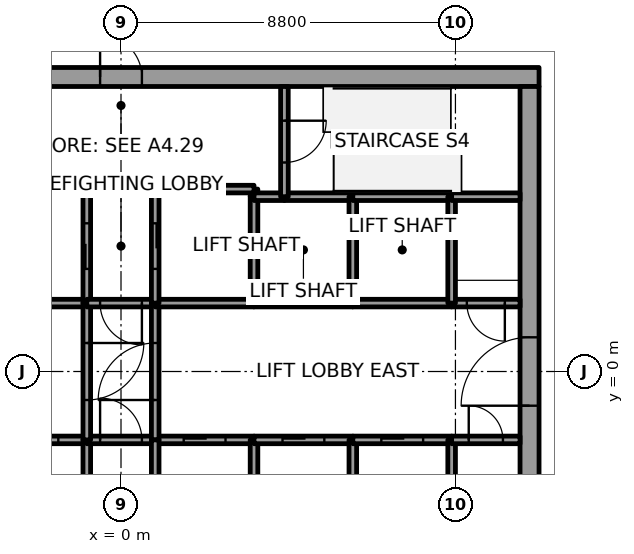
"""IFC4 building model, lengths in metres.
Left out: names, types, materials, properties, quantities, classifications, styles, units other than length and angle.
Written with IfcOpenShell. Run it as: python <this file> out.ifc"""

import sys

from ifc_helpers import new_model, si_unit, direction, frame, frame_2d, origin, place, context, subcontext, project, spatial, rectangle, extrude, element, fill, save


model = new_model("IFC4")
c1 = context("Model", 3, precision=1e-05, world=origin(), true_north=direction((0.0, 1.0)))
c2 = subcontext(c1, "Body", "Model", "MODEL_VIEW")
j1 = project(units=[si_unit("LENGTHUNIT", "METRE"), si_unit("PLANEANGLEUNIT", "RADIAN")], contexts=[c1])
p1 = place(None, origin())
s1 = spatial("IfcSite", under=j1, at=p1, CompositionType="ELEMENT")
p2 = place(p1, origin())
s2 = spatial("IfcBuilding", under=s1, at=p2, CompositionType="ELEMENT")
p3 = place(p2, frame((0.0, 0.0, 129.8)))
s3 = spatial("IfcBuildingStorey", under=s2, at=p3, CompositionType="ELEMENT", Elevation=129.8)
p4 = place(p3, frame((-11.0, 7.75, 0.0), z_axis=(0.0, 0.0, 1.0), x_axis=(1.0, 0.0, 0.0)))
e1 = element("IfcWall", 1, at=p4, inside=s3, PredefinedType="SHEAR", context=c2, shape_type="SweptSolid", body=[
    extrude(rectangle(XDim=22.0, YDim=0.5, at=frame_2d((11.0, 0.0))), origin(), (0.0, 0.0, 1.0), 4.0),
])
p5 = place(p4, frame((10.45, 0.0, 0.0)))
e2 = element("IfcOpeningElement", 2, at=p5, cuts=e1, PredefinedType="OPENING", context=c2, shape_type="SweptSolid", body=[
    extrude(rectangle(XDim=1.1, YDim=2.1, at=frame_2d((0.55, 1.05))), frame((0.0, 0.25, 0.0), z_axis=(0.0, -1.0, 0.0), x_axis=(1.0, 0.0, 0.0)), (0.0, 0.0, 1.0), 0.5),
])
p6 = place(p3, frame((10.75, -7.5, 0.0), z_axis=(0.0, 0.0, 1.0), x_axis=(0.0, 1.0, 0.0)))
e3 = element("IfcWall", 3, at=p6, inside=s3, PredefinedType="SHEAR", context=c2, shape_type="SweptSolid", body=[
    extrude(rectangle(XDim=15.0, YDim=0.5, at=frame_2d((7.5, 0.0))), origin(), (0.0, 0.0, 1.0), 4.0),
])
p7 = place(p6, frame((6.6, 0.0, 0.0)))
e4 = element("IfcOpeningElement", 4, at=p7, cuts=e3, PredefinedType="OPENING", context=c2, shape_type="SweptSolid", body=[
    extrude(rectangle(XDim=1.8, YDim=2.1, at=frame_2d((0.9, 1.05))), frame((0.0, 0.25, 0.0), z_axis=(0.0, -1.0, 0.0), x_axis=(1.0, 0.0, 0.0)), (0.0, 0.0, 1.0), 0.5),
])
p8 = place(p3, frame((-3.5, -1.8, 0.0), z_axis=(0.0, 0.0, 1.0), x_axis=(1.0, 0.0, 0.0)))
e5 = element("IfcWall", 5, at=p8, inside=s3, PredefinedType="SOLIDWALL", context=c2, shape_type="SweptSolid", body=[
    extrude(rectangle(XDim=2.6, YDim=0.2, at=frame_2d((1.3, 0.0))), origin(), (0.0, 0.0, 1.0), 3.85),
])
p9 = place(p8, frame((0.75, 0.0, 0.0)))
e6 = element("IfcOpeningElement", 6, at=p9, cuts=e5, PredefinedType="OPENING", context=c2, shape_type="SweptSolid", body=[
    extrude(rectangle(XDim=1.1, YDim=2.1, at=frame_2d((0.55, 1.05))), frame((0.0, 0.1, 0.0), z_axis=(0.0, -1.0, 0.0), x_axis=(1.0, 0.0, 0.0)), (0.0, 0.0, 1.0), 0.2),
])
p10 = place(p3, frame((-0.9, 1.8, 0.0), z_axis=(0.0, 0.0, 1.0), x_axis=(-1.0, 0.0, 0.0)))
e7 = element("IfcWall", 7, at=p10, inside=s3, PredefinedType="SOLIDWALL", context=c2, shape_type="SweptSolid", body=[
    extrude(rectangle(XDim=2.6, YDim=0.2, at=frame_2d((1.3, 0.0))), origin(), (0.0, 0.0, 1.0), 3.85),
])
p11 = place(p3, frame((-0.9, 1.8, 0.0), z_axis=(0.0, 0.0, 1.0), x_axis=(0.0, 1.0, 0.0)))
e8 = element("IfcWall", 8, at=p11, inside=s3, PredefinedType="SOLIDWALL", context=c2, shape_type="SweptSolid", body=[
    extrude(rectangle(XDim=3.0, YDim=0.2, at=frame_2d((1.5, 0.0))), origin(), (0.0, 0.0, 1.0), 3.85),
])
p12 = place(p11, frame((0.9, 0.0, 0.0)))
e9 = element("IfcOpeningElement", 9, at=p12, cuts=e8, PredefinedType="OPENING", context=c2, shape_type="SweptSolid", body=[
    extrude(rectangle(XDim=1.2, YDim=2.1, at=frame_2d((0.6, 1.05))), frame((0.0, 0.1, 0.0), z_axis=(0.0, -1.0, 0.0), x_axis=(1.0, 0.0, 0.0)), (0.0, 0.0, 1.0), 0.2),
])
p13 = place(p3, frame((-0.9, 4.8, 0.0), z_axis=(0.0, 0.0, 1.0), x_axis=(-1.0, 0.0, 0.0)))
e10 = element("IfcWall", 10, at=p13, inside=s3, PredefinedType="SOLIDWALL", context=c2, shape_type="SweptSolid", body=[
    extrude(rectangle(XDim=2.6, YDim=0.2, at=frame_2d((1.3, 0.0))), origin(), (0.0, 0.0, 1.0), 3.85),
])
p14 = place(p3, frame((-0.9, -4.6, 0.0), z_axis=(0.0, 0.0, 1.0), x_axis=(0.0, 1.0, 0.0)))
e11 = element("IfcWall", 11, at=p14, inside=s3, PredefinedType="SOLIDWALL", context=c2, shape_type="SweptSolid", body=[
    extrude(rectangle(XDim=2.8, YDim=0.2, at=frame_2d((1.4, 0.0))), origin(), (0.0, 0.0, 1.0), 3.85),
])
p15 = place(p3, frame((-0.9, -1.8, 0.0), z_axis=(0.0, 0.0, 1.0), x_axis=(1.0, 0.0, 0.0)))
e12 = element("IfcWall", 12, at=p15, inside=s3, PredefinedType="SOLIDWALL", context=c2, shape_type="SweptSolid", body=[
    extrude(rectangle(XDim=1.8, YDim=0.2, at=frame_2d((0.9, 0.0))), origin(), (0.0, 0.0, 1.0), 3.85),
])
p16 = place(p15, frame((0.35, 0.0, 0.0)))
e13 = element("IfcOpeningElement", 13, at=p16, cuts=e12, PredefinedType="OPENING", context=c2, shape_type="SweptSolid", body=[
    extrude(rectangle(XDim=1.1, YDim=2.1, at=frame_2d((0.55, 1.05))), frame((0.0, 0.1, 0.0), z_axis=(0.0, -1.0, 0.0), x_axis=(1.0, 0.0, 0.0)), (0.0, 0.0, 1.0), 0.2),
])
p17 = place(p3, frame((-0.9, 1.8, 0.0), z_axis=(0.0, 0.0, 1.0), x_axis=(0.0, -1.0, 0.0)))
e14 = element("IfcWall", 14, at=p17, inside=s3, PredefinedType="SOLIDWALL", context=c2, shape_type="SweptSolid", body=[
    extrude(rectangle(XDim=3.6, YDim=0.2, at=frame_2d((1.8, 0.0))), origin(), (0.0, 0.0, 1.0), 3.85),
])
p18 = place(p17, frame((1.05, 0.0, 0.0)))
e15 = element("IfcOpeningElement", 15, at=p18, cuts=e14, PredefinedType="OPENING", context=c2, shape_type="SweptSolid", body=[
    extrude(rectangle(XDim=1.5, YDim=2.1, at=frame_2d((0.75, 1.05))), frame((0.0, 0.1, 0.0), z_axis=(0.0, -1.0, 0.0), x_axis=(1.0, 0.0, 0.0)), (0.0, 0.0, 1.0), 0.2),
])
p19 = place(p3, frame((0.9, 1.8, 0.0), z_axis=(0.0, 0.0, 1.0), x_axis=(-1.0, 0.0, 0.0)))
e16 = element("IfcWall", 16, at=p19, inside=s3, PredefinedType="SOLIDWALL", context=c2, shape_type="SweptSolid", body=[
    extrude(rectangle(XDim=1.8, YDim=0.2, at=frame_2d((0.9, 0.0))), origin(), (0.0, 0.0, 1.0), 3.85),
])
p20 = place(p19, frame((0.35, 0.0, 0.0)))
e17 = element("IfcOpeningElement", 17, at=p20, cuts=e16, PredefinedType="OPENING", context=c2, shape_type="SweptSolid", body=[
    extrude(rectangle(XDim=1.1, YDim=2.1, at=frame_2d((0.55, 1.05))), frame((0.0, 0.1, 0.0), z_axis=(0.0, -1.0, 0.0), x_axis=(1.0, 0.0, 0.0)), (0.0, 0.0, 1.0), 0.2),
])
p21 = place(p3, frame((0.9, -1.8, 0.0), z_axis=(0.0, 0.0, 1.0), x_axis=(1.0, 0.0, 0.0)))
e18 = element("IfcWall", 18, at=p21, inside=s3, PredefinedType="SOLIDWALL", context=c2, shape_type="SweptSolid", body=[
    extrude(rectangle(XDim=2.6, YDim=0.2, at=frame_2d((1.3, 0.0))), origin(), (0.0, 0.0, 1.0), 3.85),
])
p22 = place(p21, frame((0.75, 0.0, 0.0)))
e19 = element("IfcOpeningElement", 19, at=p22, cuts=e18, PredefinedType="OPENING", context=c2, shape_type="SweptSolid", body=[
    extrude(rectangle(XDim=1.1, YDim=2.1, at=frame_2d((0.55, 1.05))), frame((0.0, 0.1, 0.0), z_axis=(0.0, -1.0, 0.0), x_axis=(1.0, 0.0, 0.0)), (0.0, 0.0, 1.0), 0.2),
])
p23 = place(p3, frame((0.9, -1.8, 0.0), z_axis=(0.0, 0.0, 1.0), x_axis=(0.0, 1.0, 0.0)))
e20 = element("IfcWall", 20, at=p23, inside=s3, PredefinedType="SOLIDWALL", context=c2, shape_type="SweptSolid", body=[
    extrude(rectangle(XDim=3.6, YDim=0.2, at=frame_2d((1.8, 0.0))), origin(), (0.0, 0.0, 1.0), 3.85),
])
p24 = place(p23, frame((1.05, 0.0, 0.0)))
e21 = element("IfcOpeningElement", 21, at=p24, cuts=e20, PredefinedType="OPENING", context=c2, shape_type="SweptSolid", body=[
    extrude(rectangle(XDim=1.5, YDim=2.1, at=frame_2d((0.75, 1.05))), frame((0.0, 0.1, 0.0), z_axis=(0.0, -1.0, 0.0), x_axis=(1.0, 0.0, 0.0)), (0.0, 0.0, 1.0), 0.2),
])
p25 = place(p3, frame((0.9, -1.8, 0.0), z_axis=(0.0, 0.0, 1.0), x_axis=(0.0, -1.0, 0.0)))
e22 = element("IfcWall", 22, at=p25, inside=s3, PredefinedType="SOLIDWALL", context=c2, shape_type="SweptSolid", body=[
    extrude(rectangle(XDim=2.8, YDim=0.2, at=frame_2d((1.4, 0.0))), origin(), (0.0, 0.0, 1.0), 3.85),
])
p26 = place(p3, frame((3.5, 1.8, 0.0), z_axis=(0.0, 0.0, 1.0), x_axis=(-1.0, 0.0, 0.0)))
e23 = element("IfcWall", 23, at=p26, inside=s3, PredefinedType="SOLIDWALL", context=c2, shape_type="SweptSolid", body=[
    extrude(rectangle(XDim=2.6, YDim=0.2, at=frame_2d((1.3, 0.0))), origin(), (0.0, 0.0, 1.0), 3.85),
])
p27 = place(p3, frame((3.5, 4.6, 0.0), z_axis=(0.0, 0.0, 1.0), x_axis=(0.0, 1.0, 0.0)))
e24 = element("IfcWall", 24, at=p27, inside=s3, PredefinedType="SOLIDWALL", context=c2, shape_type="SweptSolid", body=[
    extrude(rectangle(XDim=0.2, YDim=0.2, at=frame_2d((0.1, 0.0))), origin(), (0.0, 0.0, 1.0), 3.85),
])
p28 = place(p3, frame((3.5, 4.8, 0.0), z_axis=(0.0, 0.0, 1.0), x_axis=(-1.0, 0.0, 0.0)))
e25 = element("IfcWall", 25, at=p28, inside=s3, PredefinedType="SOLIDWALL", context=c2, shape_type="SweptSolid", body=[
    extrude(rectangle(XDim=2.6, YDim=0.2, at=frame_2d((1.3, 0.0))), origin(), (0.0, 0.0, 1.0), 3.85),
])
p29 = place(p3, frame((0.9, 4.8, 0.0), z_axis=(0.0, 0.0, 1.0), x_axis=(0.0, -1.0, 0.0)))
e26 = element("IfcWall", 26, at=p29, inside=s3, PredefinedType="SOLIDWALL", context=c2, shape_type="SweptSolid", body=[
    extrude(rectangle(XDim=3.0, YDim=0.2, at=frame_2d((1.5, 0.0))), origin(), (0.0, 0.0, 1.0), 3.85),
])
p30 = place(p29, frame((0.9, 0.0, 0.0)))
e27 = element("IfcOpeningElement", 27, at=p30, cuts=e26, PredefinedType="OPENING", context=c2, shape_type="SweptSolid", body=[
    extrude(rectangle(XDim=1.2, YDim=2.1, at=frame_2d((0.6, 1.05))), frame((0.0, 0.1, 0.0), z_axis=(0.0, -1.0, 0.0), x_axis=(1.0, 0.0, 0.0)), (0.0, 0.0, 1.0), 0.2),
])
p31 = place(p3, frame((3.5, -4.6, 0.0), z_axis=(0.0, 0.0, 1.0), x_axis=(0.0, 1.0, 0.0)))
e28 = element("IfcWall", 28, at=p31, inside=s3, PredefinedType="SOLIDWALL", context=c2, shape_type="SweptSolid", body=[
    extrude(rectangle(XDim=2.8, YDim=0.2, at=frame_2d((1.4, 0.0))), origin(), (0.0, 0.0, 1.0), 3.85),
])
p32 = place(p3, frame((3.5, -1.8, 0.0), z_axis=(0.0, 0.0, 1.0), x_axis=(1.0, 0.0, 0.0)))
e29 = element("IfcWall", 29, at=p32, inside=s3, PredefinedType="SOLIDWALL", context=c2, shape_type="SweptSolid", body=[
    extrude(rectangle(XDim=2.6, YDim=0.2, at=frame_2d((1.3, 0.0))), origin(), (0.0, 0.0, 1.0), 3.85),
])
p33 = place(p32, frame((0.75, 0.0, 0.0)))
e30 = element("IfcOpeningElement", 30, at=p33, cuts=e29, PredefinedType="OPENING", context=c2, shape_type="SweptSolid", body=[
    extrude(rectangle(XDim=1.1, YDim=2.1, at=frame_2d((0.55, 1.05))), frame((0.0, 0.1, 0.0), z_axis=(0.0, -1.0, 0.0), x_axis=(1.0, 0.0, 0.0)), (0.0, 0.0, 1.0), 0.2),
])
p34 = place(p3, frame((6.1, 1.8, 0.0), z_axis=(0.0, 0.0, 1.0), x_axis=(-1.0, 0.0, 0.0)))
e31 = element("IfcWall", 31, at=p34, inside=s3, PredefinedType="SOLIDWALL", context=c2, shape_type="SweptSolid", body=[
    extrude(rectangle(XDim=2.6, YDim=0.2, at=frame_2d((1.3, 0.0))), origin(), (0.0, 0.0, 1.0), 3.85),
])
p35 = place(p3, frame((3.5, 1.8, 0.0), z_axis=(0.0, 0.0, 1.0), x_axis=(0.0, 1.0, 0.0)))
e32 = element("IfcWall", 32, at=p35, inside=s3, PredefinedType="SOLIDWALL", context=c2, shape_type="SweptSolid", body=[
    extrude(rectangle(XDim=2.8, YDim=0.2, at=frame_2d((1.4, 0.0))), origin(), (0.0, 0.0, 1.0), 3.85),
])
p36 = place(p3, frame((4.3, 4.6, 0.0), z_axis=(0.0, 0.0, 1.0), x_axis=(-1.0, 0.0, 0.0)))
e33 = element("IfcWall", 33, at=p36, inside=s3, PredefinedType="SOLIDWALL", context=c2, shape_type="SweptSolid", body=[
    extrude(rectangle(XDim=0.8, YDim=0.2, at=frame_2d((0.4, 0.0))), origin(), (0.0, 0.0, 1.0), 3.85),
])
p37 = place(p3, frame((6.1, 4.6, 0.0), z_axis=(0.0, 0.0, 1.0), x_axis=(-1.0, 0.0, 0.0)))
e34 = element("IfcWall", 34, at=p37, inside=s3, PredefinedType="SOLIDWALL", context=c2, shape_type="SweptSolid", body=[
    extrude(rectangle(XDim=1.8, YDim=0.2, at=frame_2d((0.9, 0.0))), origin(), (0.0, 0.0, 1.0), 3.85),
])
p38 = place(p3, frame((4.3, 7.5, 0.0), z_axis=(0.0, 0.0, 1.0), x_axis=(0.0, -1.0, 0.0)))
e35 = element("IfcWall", 35, at=p38, inside=s3, PredefinedType="SOLIDWALL", context=c2, shape_type="SweptSolid", body=[
    extrude(rectangle(XDim=2.9, YDim=0.2, at=frame_2d((1.45, 0.0))), origin(), (0.0, 0.0, 1.0), 3.85),
])
p39 = place(p38, frame((0.9, 0.0, 0.0)))
e36 = element("IfcOpeningElement", 36, at=p39, cuts=e35, PredefinedType="OPENING", context=c2, shape_type="SweptSolid", body=[
    extrude(rectangle(XDim=1.1, YDim=2.1, at=frame_2d((0.55, 1.05))), frame((0.0, 0.1, 0.0), z_axis=(0.0, -1.0, 0.0), x_axis=(1.0, 0.0, 0.0)), (0.0, 0.0, 1.0), 0.2),
])
p40 = place(p3, frame((6.1, -4.6, 0.0), z_axis=(0.0, 0.0, 1.0), x_axis=(0.0, 1.0, 0.0)))
e37 = element("IfcWall", 37, at=p40, inside=s3, PredefinedType="SOLIDWALL", context=c2, shape_type="SweptSolid", body=[
    extrude(rectangle(XDim=2.8, YDim=0.2, at=frame_2d((1.4, 0.0))), origin(), (0.0, 0.0, 1.0), 3.85),
])
p41 = place(p3, frame((6.1, -1.8, 0.0), z_axis=(0.0, 0.0, 1.0), x_axis=(1.0, 0.0, 0.0)))
e38 = element("IfcWall", 38, at=p41, inside=s3, PredefinedType="SOLIDWALL", context=c2, shape_type="SweptSolid", body=[
    extrude(rectangle(XDim=2.6, YDim=0.2, at=frame_2d((1.3, 0.0))), origin(), (0.0, 0.0, 1.0), 3.85),
])
p42 = place(p41, frame((0.75, 0.0, 0.0)))
e39 = element("IfcOpeningElement", 39, at=p42, cuts=e38, PredefinedType="OPENING", context=c2, shape_type="SweptSolid", body=[
    extrude(rectangle(XDim=1.1, YDim=2.1, at=frame_2d((0.55, 1.05))), frame((0.0, 0.1, 0.0), z_axis=(0.0, -1.0, 0.0), x_axis=(1.0, 0.0, 0.0)), (0.0, 0.0, 1.0), 0.2),
])
p43 = place(p3, frame((8.7, 1.8, 0.0), z_axis=(0.0, 0.0, 1.0), x_axis=(-1.0, 0.0, 0.0)))
e40 = element("IfcWall", 40, at=p43, inside=s3, PredefinedType="SOLIDWALL", context=c2, shape_type="SweptSolid", body=[
    extrude(rectangle(XDim=2.6, YDim=0.2, at=frame_2d((1.3, 0.0))), origin(), (0.0, 0.0, 1.0), 3.85),
])
p44 = place(p3, frame((6.1, 1.8, 0.0), z_axis=(0.0, 0.0, 1.0), x_axis=(0.0, 1.0, 0.0)))
e41 = element("IfcWall", 41, at=p44, inside=s3, PredefinedType="SOLIDWALL", context=c2, shape_type="SweptSolid", body=[
    extrude(rectangle(XDim=2.8, YDim=0.2, at=frame_2d((1.4, 0.0))), origin(), (0.0, 0.0, 1.0), 3.85),
])
p45 = place(p3, frame((8.7, 4.6, 0.0), z_axis=(0.0, 0.0, 1.0), x_axis=(-1.0, 0.0, 0.0)))
e42 = element("IfcWall", 42, at=p45, inside=s3, PredefinedType="SOLIDWALL", context=c2, shape_type="SweptSolid", body=[
    extrude(rectangle(XDim=2.6, YDim=0.2, at=frame_2d((1.3, 0.0))), origin(), (0.0, 0.0, 1.0), 3.85),
])
p46 = place(p3, frame((8.7, -1.8, 0.0), z_axis=(0.0, 0.0, 1.0), x_axis=(0.0, -1.0, 0.0)))
e43 = element("IfcWall", 43, at=p46, inside=s3, PredefinedType="SOLIDWALL", context=c2, shape_type="SweptSolid", body=[
    extrude(rectangle(XDim=2.8, YDim=0.2, at=frame_2d((1.4, 0.0))), origin(), (0.0, 0.0, 1.0), 3.85),
])
p47 = place(p3, frame((8.7, -1.8, 0.0), z_axis=(0.0, 0.0, 1.0), x_axis=(1.0, 0.0, 0.0)))
e44 = element("IfcWall", 44, at=p47, inside=s3, PredefinedType="SOLIDWALL", context=c2, shape_type="SweptSolid", body=[
    extrude(rectangle(XDim=1.8, YDim=0.2, at=frame_2d((0.9, 0.0))), origin(), (0.0, 0.0, 1.0), 3.85),
])
p48 = place(p47, frame((0.45, 0.0, 0.0)))
e45 = element("IfcOpeningElement", 45, at=p48, cuts=e44, PredefinedType="OPENING", context=c2, shape_type="SweptSolid", body=[
    extrude(rectangle(XDim=0.9, YDim=2.1, at=frame_2d((0.45, 1.05))), frame((0.0, 0.1, 0.0), z_axis=(0.0, -1.0, 0.0), x_axis=(1.0, 0.0, 0.0)), (0.0, 0.0, 1.0), 0.2),
])
p49 = place(p3, frame((10.5, 1.8, 0.0), z_axis=(0.0, 0.0, 1.0), x_axis=(-1.0, 0.0, 0.0)))
e46 = element("IfcWall", 46, at=p49, inside=s3, PredefinedType="SOLIDWALL", context=c2, shape_type="SweptSolid", body=[
    extrude(rectangle(XDim=1.8, YDim=0.2, at=frame_2d((0.9, 0.0))), origin(), (0.0, 0.0, 1.0), 3.85),
])
p50 = place(p49, frame((0.4, 0.0, 0.0)))
e47 = element("IfcOpeningElement", 47, at=p50, cuts=e46, PredefinedType="OPENING", context=c2, shape_type="SweptSolid", body=[
    extrude(rectangle(XDim=1.0, YDim=2.1, at=frame_2d((0.5, 1.05))), frame((0.0, 0.1, 0.0), z_axis=(0.0, -1.0, 0.0), x_axis=(1.0, 0.0, 0.0)), (0.0, 0.0, 1.0), 0.2),
])
p51 = place(p3, frame((8.7, 4.6, 0.0), z_axis=(0.0, 0.0, 1.0), x_axis=(0.0, -1.0, 0.0)))
e48 = element("IfcWall", 48, at=p51, inside=s3, PredefinedType="SOLIDWALL", context=c2, shape_type="SweptSolid", body=[
    extrude(rectangle(XDim=2.8, YDim=0.2, at=frame_2d((1.4, 0.0))), origin(), (0.0, 0.0, 1.0), 3.85),
])
p52 = place(p3, frame((10.5, 4.6, 0.0), z_axis=(0.0, 0.0, 1.0), x_axis=(-1.0, 0.0, 0.0)))
e49 = element("IfcWall", 49, at=p52, inside=s3, PredefinedType="SOLIDWALL", context=c2, shape_type="SweptSolid", body=[
    extrude(rectangle(XDim=1.8, YDim=0.2, at=frame_2d((0.9, 0.0))), origin(), (0.0, 0.0, 1.0), 3.85),
])
p53 = place(p9, origin())
e50 = element("IfcDoor", 50, at=p53, inside=s3, OperationType="SLIDING_TO_RIGHT", PredefinedType="DOOR", context=c2, shape_type="SweptSolid", body=[
    extrude(rectangle(XDim=1.1, YDim=2.1, at=frame_2d((0.55, 1.05))), frame((0.0, 0.025, 0.0), z_axis=(0.0, -1.0, 0.0), x_axis=(1.0, 0.0, 0.0)), (0.0, 0.0, 1.0), 0.05),
])
fill(e6, e50)
p54 = place(p22, origin())
e51 = element("IfcDoor", 51, at=p54, inside=s3, OperationType="SLIDING_TO_RIGHT", PredefinedType="DOOR", context=c2, shape_type="SweptSolid", body=[
    extrude(rectangle(XDim=1.1, YDim=2.1, at=frame_2d((0.55, 1.05))), frame((0.0, 0.025, 0.0), z_axis=(0.0, -1.0, 0.0), x_axis=(1.0, 0.0, 0.0)), (0.0, 0.0, 1.0), 0.05),
])
fill(e19, e51)
p55 = place(p33, origin())
e52 = element("IfcDoor", 52, at=p55, inside=s3, OperationType="SLIDING_TO_LEFT", PredefinedType="DOOR", context=c2, shape_type="SweptSolid", body=[
    extrude(rectangle(XDim=1.1, YDim=2.1, at=frame_2d((0.55, 1.05))), frame((0.0, 0.025, 0.0), z_axis=(0.0, -1.0, 0.0), x_axis=(1.0, 0.0, 0.0)), (0.0, 0.0, 1.0), 0.05),
])
fill(e30, e52)
p56 = place(p42, origin())
e53 = element("IfcDoor", 53, at=p56, inside=s3, OperationType="SLIDING_TO_LEFT", PredefinedType="DOOR", context=c2, shape_type="SweptSolid", body=[
    extrude(rectangle(XDim=1.1, YDim=2.1, at=frame_2d((0.55, 1.05))), frame((0.0, 0.025, 0.0), z_axis=(0.0, -1.0, 0.0), x_axis=(1.0, 0.0, 0.0)), (0.0, 0.0, 1.0), 0.05),
])
fill(e39, e53)
p57 = place(p12, origin())
e54 = element("IfcDoor", 54, at=p57, inside=s3, OperationType="SLIDING_TO_LEFT", PredefinedType="DOOR", context=c2, shape_type="SweptSolid", body=[
    extrude(rectangle(XDim=1.2, YDim=2.1, at=frame_2d((0.6, 1.05))), frame((0.0, 0.025, 0.0), z_axis=(0.0, -1.0, 0.0), x_axis=(1.0, 0.0, 0.0)), (0.0, 0.0, 1.0), 0.05),
])
fill(e9, e54)
p58 = place(p30, origin())
e55 = element("IfcDoor", 55, at=p58, inside=s3, OperationType="SLIDING_TO_LEFT", PredefinedType="DOOR", context=c2, shape_type="SweptSolid", body=[
    extrude(rectangle(XDim=1.2, YDim=2.1, at=frame_2d((0.6, 1.05))), frame((0.0, 0.025, 0.0), z_axis=(0.0, -1.0, 0.0), x_axis=(1.0, 0.0, 0.0)), (0.0, 0.0, 1.0), 0.05),
])
fill(e27, e55)
p59 = place(p18, origin())
e56 = element("IfcDoor", 56, at=p59, inside=s3, OperationType="DOUBLE_DOOR_SINGLE_SWING", PredefinedType="DOOR", context=c2, shape_type="SweptSolid", body=[
    extrude(rectangle(XDim=1.5, YDim=2.1, at=frame_2d((0.75, 1.05))), frame((0.0, 0.025, 0.0), z_axis=(0.0, -1.0, 0.0), x_axis=(1.0, 0.0, 0.0)), (0.0, 0.0, 1.0), 0.05),
])
fill(e15, e56)
p60 = place(p24, origin())
e57 = element("IfcDoor", 57, at=p60, inside=s3, OperationType="DOUBLE_DOOR_SINGLE_SWING", PredefinedType="DOOR", context=c2, shape_type="SweptSolid", body=[
    extrude(rectangle(XDim=1.5, YDim=2.1, at=frame_2d((0.75, 1.05))), frame((0.0, 0.025, 0.0), z_axis=(0.0, -1.0, 0.0), x_axis=(1.0, 0.0, 0.0)), (0.0, 0.0, 1.0), 0.05),
])
fill(e21, e57)
p61 = place(p20, origin())
e58 = element("IfcDoor", 58, at=p61, inside=s3, OperationType="SINGLE_SWING_LEFT", PredefinedType="DOOR", context=c2, shape_type="SweptSolid", body=[
    extrude(rectangle(XDim=1.1, YDim=2.1, at=frame_2d((0.55, 1.05))), frame((0.0, 0.025, 0.0), z_axis=(0.0, -1.0, 0.0), x_axis=(1.0, 0.0, 0.0)), (0.0, 0.0, 1.0), 0.05),
])
fill(e17, e58)
p62 = place(p16, origin())
e59 = element("IfcDoor", 59, at=p62, inside=s3, OperationType="SINGLE_SWING_RIGHT", PredefinedType="DOOR", context=c2, shape_type="SweptSolid", body=[
    extrude(rectangle(XDim=1.1, YDim=2.1, at=frame_2d((0.55, 1.05))), frame((0.0, 0.025, 0.0), z_axis=(0.0, -1.0, 0.0), x_axis=(1.0, 0.0, 0.0)), (0.0, 0.0, 1.0), 0.05),
])
fill(e13, e59)
p63 = place(p50, origin())
e60 = element("IfcDoor", 60, at=p63, inside=s3, OperationType="SINGLE_SWING_LEFT", PredefinedType="DOOR", context=c2, shape_type="SweptSolid", body=[
    extrude(rectangle(XDim=1.0, YDim=2.1, at=frame_2d((0.5, 1.05))), frame((0.0, 0.025, 0.0), z_axis=(0.0, -1.0, 0.0), x_axis=(1.0, 0.0, 0.0)), (0.0, 0.0, 1.0), 0.05),
])
fill(e47, e60)
p64 = place(p39, origin())
e61 = element("IfcDoor", 61, at=p64, inside=s3, OperationType="SINGLE_SWING_RIGHT", PredefinedType="DOOR", context=c2, shape_type="SweptSolid", body=[
    extrude(rectangle(XDim=1.1, YDim=2.1, at=frame_2d((0.55, 1.05))), frame((0.0, 0.025, 0.0), z_axis=(0.0, -1.0, 0.0), x_axis=(1.0, 0.0, 0.0)), (0.0, 0.0, 1.0), 0.05),
])
fill(e36, e61)
p65 = place(p48, origin())
e62 = element("IfcDoor", 62, at=p65, inside=s3, OperationType="SINGLE_SWING_RIGHT", PredefinedType="DOOR", context=c2, shape_type="SweptSolid", body=[
    extrude(rectangle(XDim=0.9, YDim=2.1, at=frame_2d((0.45, 1.05))), frame((0.0, 0.025, 0.0), z_axis=(0.0, -1.0, 0.0), x_axis=(1.0, 0.0, 0.0)), (0.0, 0.0, 1.0), 0.05),
])
fill(e45, e62)
p66 = place(p7, origin())
e63 = element("IfcDoor", 63, at=p66, inside=s3, OperationType="DOUBLE_DOOR_SINGLE_SWING", PredefinedType="DOOR", context=c2, shape_type="SweptSolid", body=[
    extrude(rectangle(XDim=1.8, YDim=2.1, at=frame_2d((0.9, 1.05))), frame((0.0, 0.025, 0.0), z_axis=(0.0, -1.0, 0.0), x_axis=(1.0, 0.0, 0.0)), (0.0, 0.0, 1.0), 0.05),
])
fill(e4, e63)
p67 = place(p5, origin())
e64 = element("IfcDoor", 64, at=p67, inside=s3, OperationType="SINGLE_SWING_RIGHT", PredefinedType="DOOR", context=c2, shape_type="SweptSolid", body=[
    extrude(rectangle(XDim=1.1, YDim=2.1, at=frame_2d((0.55, 1.05))), frame((0.0, 0.025, 0.0), z_axis=(0.0, -1.0, 0.0), x_axis=(1.0, 0.0, 0.0)), (0.0, 0.0, 1.0), 0.05),
])
fill(e2, e64)
save(model, sys.argv[1])
